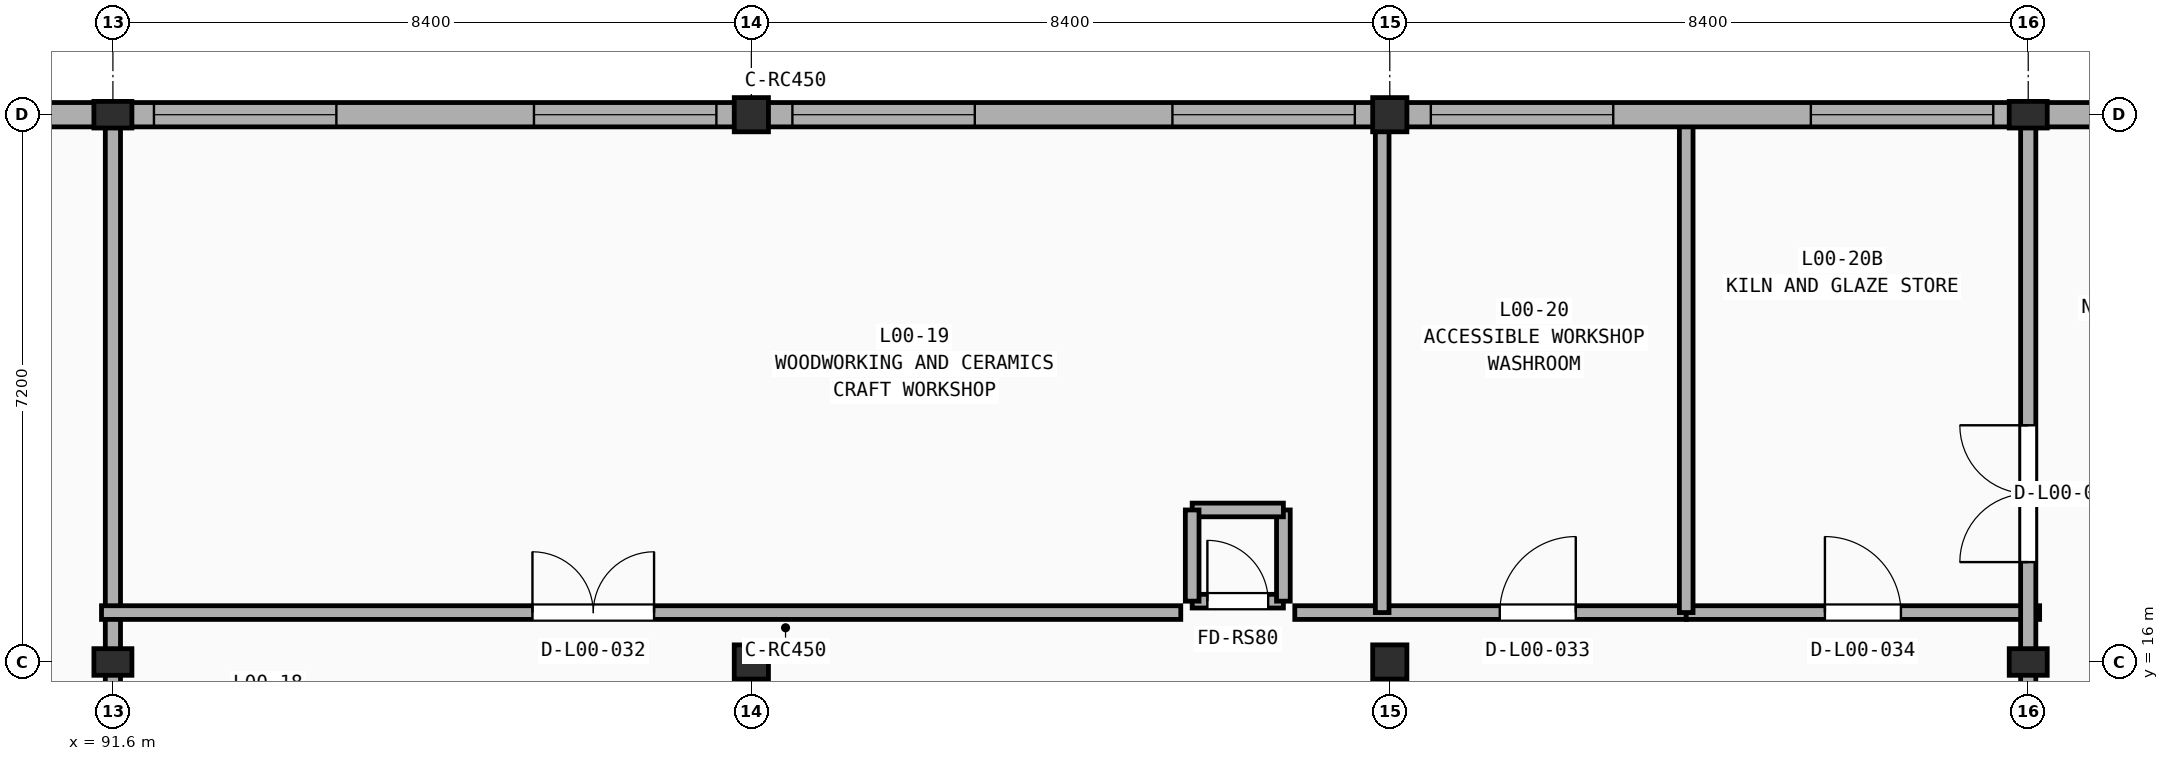
"""IFC4 building model, lengths in metres.
Left out: names, types, materials, properties, quantities, classifications, styles, units other than length and angle.
Written with IfcOpenShell. Run it as: python <this file> out.ifc"""

import sys

from ifc_helpers import new_model, si_unit, direction, frame, frame_2d, origin, origin_2d, place, context, subcontext, project, spatial, rectangle, extrude, element, fill, save


model = new_model("IFC4")
c1 = context("Model", 3, precision=1e-05, world=origin(), true_north=direction((0.0, 1.0)))
c2 = subcontext(c1, "Body", "Model", "MODEL_VIEW")
j1 = project(units=[si_unit("LENGTHUNIT", "METRE"), si_unit("PLANEANGLEUNIT", "RADIAN")], contexts=[c1])
p1 = place(None, origin())
s1 = spatial("IfcSite", under=j1, at=p1, CompositionType="ELEMENT")
p2 = place(p1, origin())
s2 = spatial("IfcBuilding", under=s1, at=p2, CompositionType="ELEMENT")
p3 = place(p2, origin())
s3 = spatial("IfcBuildingStorey", under=s2, at=p3, CompositionType="ELEMENT", Elevation=0.0)
for number, where, z_axis, x_axis in (
    (1, (91.6, 16.0, 0.0), (0.0, 0.0, 1.0), (1.0, 0.0, 0.0)),
    (2, (91.6, 23.2, 0.0), (0.0, 0.0, 1.0), (1.0, 0.0, 0.0)),
):
    element("IfcColumn", number, at=place(p3, frame(where, z_axis=z_axis, x_axis=x_axis)), inside=s3, PredefinedType="PILASTER", context=c2, shape_type="SweptSolid", body=[
        extrude(rectangle(XDim=0.5, YDim=0.35, at=origin_2d()), origin(), (0.0, 0.0, 1.0), 5.4),
    ])
for number, where, z_axis, x_axis in (
    (3, (100.0, 16.0, 0.0), (0.0, 0.0, 1.0), (1.0, 0.0, 0.0)),
    (4, (100.0, 23.2, 0.0), (0.0, 0.0, 1.0), (1.0, 0.0, 0.0)),
    (5, (108.4, 16.0, 0.0), (0.0, 0.0, 1.0), (1.0, 0.0, 0.0)),
    (6, (108.4, 23.2, 0.0), (0.0, 0.0, 1.0), (1.0, 0.0, 0.0)),
):
    element("IfcColumn", number, at=place(p3, frame(where, z_axis=z_axis, x_axis=x_axis)), inside=s3, PredefinedType="COLUMN", context=c2, shape_type="SweptSolid", body=[
        extrude(rectangle(XDim=0.45, YDim=0.45, at=origin_2d()), origin(), (0.0, 0.0, 1.0), 5.4),
    ])
for number, where, z_axis, x_axis in (
    (7, (116.8, 16.0, 0.0), (0.0, 0.0, 1.0), (1.0, 0.0, 0.0)),
    (8, (116.8, 23.2, 0.0), (0.0, 0.0, 1.0), (1.0, 0.0, 0.0)),
):
    element("IfcColumn", number, at=place(p3, frame(where, z_axis=z_axis, x_axis=x_axis)), inside=s3, PredefinedType="PILASTER", context=c2, shape_type="SweptSolid", body=[
        extrude(rectangle(XDim=0.5, YDim=0.35, at=origin_2d()), origin(), (0.0, 0.0, 1.0), 5.4),
    ])
p4 = place(p3, frame((91.6, 8.95, 0.0), z_axis=(0.0, 0.0, 1.0), x_axis=(0.0, 1.0, 0.0)))
e9 = element("IfcWall", 9, at=p4, inside=s3, PredefinedType="PARTITIONING", context=c2, shape_type="SweptSolid", body=[
    extrude(rectangle(XDim=14.1, YDim=0.2, at=frame_2d((7.05, 0.0))), origin(), (0.0, 0.0, 1.0), 3.99),
])
p5 = place(p4, frame((3.936, 0.0, -0.01)))
e10 = element("IfcOpeningElement", 10, at=p5, cuts=e9, PredefinedType="OPENING", context=c2, shape_type="SweptSolid", body=[
    extrude(rectangle(XDim=1.8, YDim=2.26, at=frame_2d((0.9, 1.13))), frame((0.0, 0.11, 0.0), z_axis=(0.0, -1.0, 0.0), x_axis=(1.0, 0.0, 0.0)), (0.0, 0.0, 1.0), 0.22),
])
p6 = place(p3, frame((91.45, 16.65, 0.0), z_axis=(0.0, 0.0, 1.0), x_axis=(1.0, 0.0, 0.0)))
e11 = element("IfcWall", 11, at=p6, inside=s3, PredefinedType="PARTITIONING", context=c2, shape_type="SweptSolid", body=[
    extrude(rectangle(XDim=14.2, YDim=0.18, at=frame_2d((7.1, 0.0))), origin(), (0.0, 0.0, 1.0), 4.64),
])
p7 = place(p6, frame((5.67, 0.0, -0.01)))
e12 = element("IfcOpeningElement", 12, at=p7, cuts=e11, PredefinedType="OPENING", context=c2, shape_type="SweptSolid", body=[
    extrude(rectangle(XDim=1.6, YDim=2.21, at=frame_2d((0.8, 1.105))), frame((0.0, 0.1, 0.0), z_axis=(0.0, -1.0, 0.0), x_axis=(1.0, 0.0, 0.0)), (0.0, 0.0, 1.0), 0.2),
])
p8 = place(p3, frame((107.15, 16.65, 0.0), z_axis=(0.0, 0.0, 1.0), x_axis=(1.0, 0.0, 0.0)))
e13 = element("IfcWall", 13, at=p8, inside=s3, PredefinedType="PARTITIONING", context=c2, shape_type="SweptSolid", body=[
    extrude(rectangle(XDim=5.15, YDim=0.18, at=frame_2d((2.575, 0.0))), origin(), (0.0, 0.0, 1.0), 4.64),
])
p9 = place(p8, frame((2.697, 0.0, -0.01)))
e14 = element("IfcOpeningElement", 14, at=p9, cuts=e13, PredefinedType="OPENING", context=c2, shape_type="SweptSolid", body=[
    extrude(rectangle(XDim=1.0, YDim=2.16, at=frame_2d((0.5, 1.08))), frame((0.0, 0.1, 0.0), z_axis=(0.0, -1.0, 0.0), x_axis=(1.0, 0.0, 0.0)), (0.0, 0.0, 1.0), 0.2),
])
p10 = place(p3, frame((112.3, 16.65, 0.0), z_axis=(0.0, 0.0, 1.0), x_axis=(1.0, 0.0, 0.0)))
e15 = element("IfcWall", 15, at=p10, inside=s3, PredefinedType="PARTITIONING", context=c2, shape_type="SweptSolid", body=[
    extrude(rectangle(XDim=4.65, YDim=0.18, at=frame_2d((2.325, 0.0))), origin(), (0.0, 0.0, 1.0), 4.64),
])
p11 = place(p10, frame((1.825, 0.0, -0.01)))
e16 = element("IfcOpeningElement", 16, at=p11, cuts=e15, PredefinedType="OPENING", context=c2, shape_type="SweptSolid", body=[
    extrude(rectangle(XDim=1.0, YDim=2.16, at=frame_2d((0.5, 1.08))), frame((0.0, 0.1, 0.0), z_axis=(0.0, -1.0, 0.0), x_axis=(1.0, 0.0, 0.0)), (0.0, 0.0, 1.0), 0.2),
])
for number, where, z_axis, x_axis in (
    (17, (108.3, 16.65, 0.0), (0.0, 0.0, 1.0), (0.0, 1.0, 0.0)),
    (18, (112.3, 16.65, 0.0), (0.0, 0.0, 1.0), (0.0, 1.0, 0.0)),
):
    element("IfcWall", number, at=place(p3, frame(where, z_axis=z_axis, x_axis=x_axis)), inside=s3, PredefinedType="PARTITIONING", context=c2, shape_type="SweptSolid", body=[
        extrude(rectangle(XDim=6.4, YDim=0.18, at=frame_2d((3.2, 0.0))), origin(), (0.0, 0.0, 1.0), 4.64),
    ])
p12 = place(p3, frame((116.8, 8.95, 0.0), z_axis=(0.0, 0.0, 1.0), x_axis=(0.0, 1.0, 0.0)))
e19 = element("IfcWall", 19, at=p12, inside=s3, PredefinedType="PARTITIONING", context=c2, shape_type="SweptSolid", body=[
    extrude(rectangle(XDim=14.1, YDim=0.2, at=frame_2d((7.05, 0.0))), origin(), (0.0, 0.0, 1.0), 3.99),
])
p13 = place(p12, frame((8.364, 0.0, -0.01)))
e20 = element("IfcOpeningElement", 20, at=p13, cuts=e19, PredefinedType="OPENING", context=c2, shape_type="SweptSolid", body=[
    extrude(rectangle(XDim=1.8, YDim=2.26, at=frame_2d((0.9, 1.13))), frame((0.0, 0.11, 0.0), z_axis=(0.0, -1.0, 0.0), x_axis=(1.0, 0.0, 0.0)), (0.0, 0.0, 1.0), 0.22),
])
p14 = place(p3, frame((100.0, 23.2, 0.0), z_axis=(0.0, 0.0, 1.0), x_axis=(-1.0, 0.0, 0.0)))
e21 = element("IfcWall", 21, at=p14, inside=s3, PredefinedType="SOLIDWALL", context=c2, shape_type="SweptSolid", body=[
    extrude(rectangle(XDim=8.4, YDim=0.32, at=frame_2d((4.2, 0.0))), origin(), (0.0, 0.0, 1.0), 3.99),
])
p15 = place(p14, frame((0.46, 0.0, 0.9)))
e22 = element("IfcOpeningElement", 22, at=p15, cuts=e21, PredefinedType="OPENING", context=c2, shape_type="SweptSolid", body=[
    extrude(rectangle(XDim=2.4, YDim=2.35, at=frame_2d((1.2, 1.175))), frame((0.0, 0.17, 0.0), z_axis=(0.0, -1.0, 0.0), x_axis=(1.0, 0.0, 0.0)), (0.0, 0.0, 1.0), 0.34),
])
p16 = place(p14, frame((5.46, 0.0, 0.9)))
e23 = element("IfcOpeningElement", 23, at=p16, cuts=e21, PredefinedType="OPENING", context=c2, shape_type="SweptSolid", body=[
    extrude(rectangle(XDim=2.4, YDim=2.35, at=frame_2d((1.2, 1.175))), frame((0.0, 0.17, 0.0), z_axis=(0.0, -1.0, 0.0), x_axis=(1.0, 0.0, 0.0)), (0.0, 0.0, 1.0), 0.34),
])
p17 = place(p3, frame((108.4, 23.2, 0.0), z_axis=(0.0, 0.0, 1.0), x_axis=(-1.0, 0.0, 0.0)))
e24 = element("IfcWall", 24, at=p17, inside=s3, PredefinedType="SOLIDWALL", context=c2, shape_type="SweptSolid", body=[
    extrude(rectangle(XDim=8.4, YDim=0.32, at=frame_2d((4.2, 0.0))), origin(), (0.0, 0.0, 1.0), 4.64),
])
p18 = place(p17, frame((0.46, 0.0, 0.9)))
e25 = element("IfcOpeningElement", 25, at=p18, cuts=e24, PredefinedType="OPENING", context=c2, shape_type="SweptSolid", body=[
    extrude(rectangle(XDim=2.4, YDim=2.35, at=frame_2d((1.2, 1.175))), frame((0.0, 0.17, 0.0), z_axis=(0.0, -1.0, 0.0), x_axis=(1.0, 0.0, 0.0)), (0.0, 0.0, 1.0), 0.34),
])
p19 = place(p17, frame((5.46, 0.0, 0.9)))
e26 = element("IfcOpeningElement", 26, at=p19, cuts=e24, PredefinedType="OPENING", context=c2, shape_type="SweptSolid", body=[
    extrude(rectangle(XDim=2.4, YDim=2.35, at=frame_2d((1.2, 1.175))), frame((0.0, 0.17, 0.0), z_axis=(0.0, -1.0, 0.0), x_axis=(1.0, 0.0, 0.0)), (0.0, 0.0, 1.0), 0.34),
])
p20 = place(p3, frame((116.8, 23.2, 0.0), z_axis=(0.0, 0.0, 1.0), x_axis=(-1.0, 0.0, 0.0)))
e27 = element("IfcWall", 27, at=p20, inside=s3, PredefinedType="SOLIDWALL", context=c2, shape_type="SweptSolid", body=[
    extrude(rectangle(XDim=8.4, YDim=0.32, at=frame_2d((4.2, 0.0))), origin(), (0.0, 0.0, 1.0), 3.99),
])
p21 = place(p20, frame((0.46, 0.0, 0.9)))
e28 = element("IfcOpeningElement", 28, at=p21, cuts=e27, PredefinedType="OPENING", context=c2, shape_type="SweptSolid", body=[
    extrude(rectangle(XDim=2.4, YDim=2.35, at=frame_2d((1.2, 1.175))), frame((0.0, 0.17, 0.0), z_axis=(0.0, -1.0, 0.0), x_axis=(1.0, 0.0, 0.0)), (0.0, 0.0, 1.0), 0.34),
])
p22 = place(p20, frame((5.46, 0.0, 0.9)))
e29 = element("IfcOpeningElement", 29, at=p22, cuts=e27, PredefinedType="OPENING", context=c2, shape_type="SweptSolid", body=[
    extrude(rectangle(XDim=2.4, YDim=2.35, at=frame_2d((1.2, 1.175))), frame((0.0, 0.17, 0.0), z_axis=(0.0, -1.0, 0.0), x_axis=(1.0, 0.0, 0.0)), (0.0, 0.0, 1.0), 0.34),
])
p23 = place(p3, frame((91.6, 23.2, 0.0), z_axis=(0.0, 0.0, 1.0), x_axis=(-1.0, 0.0, 0.0)))
e30 = element("IfcWall", 30, at=p23, inside=s3, PredefinedType="SOLIDWALL", context=c2, shape_type="SweptSolid", body=[
    extrude(rectangle(XDim=4.8, YDim=0.32, at=frame_2d((2.4, 0.0))), origin(), (0.0, 0.0, 1.0), 3.99),
])
p24 = place(p23, frame((1.46, 0.0, 0.9)))
e31 = element("IfcOpeningElement", 31, at=p24, cuts=e30, PredefinedType="OPENING", context=c2, shape_type="SweptSolid", body=[
    extrude(rectangle(XDim=1.8, YDim=2.2, at=frame_2d((0.9, 1.1))), frame((0.0, 0.17, 0.0), z_axis=(0.0, -1.0, 0.0), x_axis=(1.0, 0.0, 0.0)), (0.0, 0.0, 1.0), 0.34),
])
p25 = place(p3, frame((121.6, 23.2, 0.0), z_axis=(0.0, 0.0, 1.0), x_axis=(-1.0, 0.0, 0.0)))
e32 = element("IfcWall", 32, at=p25, inside=s3, PredefinedType="SOLIDWALL", context=c2, shape_type="SweptSolid", body=[
    extrude(rectangle(XDim=4.8, YDim=0.32, at=frame_2d((2.4, 0.0))), origin(), (0.0, 0.0, 1.0), 3.99),
])
p26 = place(p25, frame((1.46, 0.0, 0.9)))
e33 = element("IfcOpeningElement", 33, at=p26, cuts=e32, PredefinedType="OPENING", context=c2, shape_type="SweptSolid", body=[
    extrude(rectangle(XDim=1.8, YDim=2.2, at=frame_2d((0.9, 1.1))), frame((0.0, 0.17, 0.0), z_axis=(0.0, -1.0, 0.0), x_axis=(1.0, 0.0, 0.0)), (0.0, 0.0, 1.0), 0.34),
])
p27 = place(p3, frame((105.8, 16.8, 0.0), z_axis=(0.0, 0.0, 1.0), x_axis=(1.0, 0.0, 0.0)))
e34 = element("IfcWall", 34, at=p27, inside=s3, PredefinedType="SOLIDWALL", context=c2, shape_type="SweptSolid", body=[
    extrude(rectangle(XDim=1.2, YDim=0.18, at=frame_2d((0.6, 0.0))), origin(), (0.0, 0.0, 1.0), 5.07),
])
p28 = place(p27, frame((0.2, 0.0, -0.01)))
e35 = element("IfcOpeningElement", 35, at=p28, cuts=e34, PredefinedType="OPENING", context=c2, shape_type="SweptSolid", body=[
    extrude(rectangle(XDim=0.8, YDim=2.06, at=frame_2d((0.4, 1.03))), frame((0.0, 0.1, 0.0), z_axis=(0.0, -1.0, 0.0), x_axis=(1.0, 0.0, 0.0)), (0.0, 0.0, 1.0), 0.2),
])
for number, where, z_axis, x_axis in (
    (36, (107.0, 16.8, 0.0), (0.0, 0.0, 1.0), (0.0, 1.0, 0.0)),
    (37, (107.0, 18.0, 0.0), (0.0, 0.0, 1.0), (-1.0, 0.0, 0.0)),
    (38, (105.8, 18.0, 0.0), (0.0, 0.0, 1.0), (0.0, -1.0, 0.0)),
):
    element("IfcWall", number, at=place(p3, frame(where, z_axis=z_axis, x_axis=x_axis)), inside=s3, PredefinedType="SOLIDWALL", context=c2, shape_type="SweptSolid", body=[
        extrude(rectangle(XDim=1.2, YDim=0.18, at=frame_2d((0.6, 0.0))), origin(), (0.0, 0.0, 1.0), 5.07),
    ])
p29 = place(p7, frame((0.0, 0.0, 0.01)))
e39 = element("IfcDoor", 39, at=p29, inside=s3, OperationType="DOUBLE_SWING_LEFT", PredefinedType="DOOR", context=c2, shape_type="SweptSolid", body=[
    extrude(rectangle(XDim=1.6, YDim=2.2, at=frame_2d((0.8, 1.1))), frame((0.0, 0.025, 0.0), z_axis=(0.0, -1.0, 0.0), x_axis=(1.0, 0.0, 0.0)), (0.0, 0.0, 1.0), 0.05),
])
fill(e12, e39)
p30 = place(p9, frame((1.0, 0.0, 0.01), z_axis=(0.0, 0.0, 1.0), x_axis=(-1.0, 0.0, 0.0)))
e40 = element("IfcDoor", 40, at=p30, inside=s3, OperationType="SINGLE_SWING_RIGHT", PredefinedType="DOOR", context=c2, shape_type="SweptSolid", body=[
    extrude(rectangle(XDim=1.0, YDim=2.15, at=frame_2d((0.5, 1.075))), frame((0.0, 0.025, 0.0), z_axis=(0.0, -1.0, 0.0), x_axis=(1.0, 0.0, 0.0)), (0.0, 0.0, 1.0), 0.05),
])
fill(e14, e40)
p31 = place(p11, frame((0.0, 0.0, 0.01)))
e41 = element("IfcDoor", 41, at=p31, inside=s3, OperationType="SINGLE_SWING_LEFT", PredefinedType="DOOR", context=c2, shape_type="SweptSolid", body=[
    extrude(rectangle(XDim=1.0, YDim=2.15, at=frame_2d((0.5, 1.075))), frame((0.0, 0.025, 0.0), z_axis=(0.0, -1.0, 0.0), x_axis=(1.0, 0.0, 0.0)), (0.0, 0.0, 1.0), 0.05),
])
fill(e16, e41)
p32 = place(p13, frame((0.0, 0.0, 0.01)))
e42 = element("IfcDoor", 42, at=p32, inside=s3, OperationType="DOUBLE_SWING_LEFT", PredefinedType="DOOR", context=c2, shape_type="SweptSolid", body=[
    extrude(rectangle(XDim=1.8, YDim=2.25, at=frame_2d((0.9, 1.125))), frame((0.0, 0.025, 0.0), z_axis=(0.0, -1.0, 0.0), x_axis=(1.0, 0.0, 0.0)), (0.0, 0.0, 1.0), 0.05),
])
fill(e20, e42)
p33 = place(p15, origin())
e43 = element("IfcWindow", 43, at=p33, inside=s3, PartitioningType="TRIPLE_PANEL_VERTICAL", PredefinedType="WINDOW", context=c2, shape_type="SweptSolid", body=[
    extrude(rectangle(XDim=2.4, YDim=2.35, at=frame_2d((1.2, 1.175))), frame((0.0, 0.03, 0.0), z_axis=(0.0, -1.0, 0.0), x_axis=(1.0, 0.0, 0.0)), (0.0, 0.0, 1.0), 0.06),
])
fill(e22, e43)
p34 = place(p16, origin())
e44 = element("IfcWindow", 44, at=p34, inside=s3, PartitioningType="TRIPLE_PANEL_VERTICAL", PredefinedType="WINDOW", context=c2, shape_type="SweptSolid", body=[
    extrude(rectangle(XDim=2.4, YDim=2.35, at=frame_2d((1.2, 1.175))), frame((0.0, 0.03, 0.0), z_axis=(0.0, -1.0, 0.0), x_axis=(1.0, 0.0, 0.0)), (0.0, 0.0, 1.0), 0.06),
])
fill(e23, e44)
p35 = place(p18, origin())
e45 = element("IfcWindow", 45, at=p35, inside=s3, PartitioningType="TRIPLE_PANEL_VERTICAL", PredefinedType="WINDOW", context=c2, shape_type="SweptSolid", body=[
    extrude(rectangle(XDim=2.4, YDim=2.35, at=frame_2d((1.2, 1.175))), frame((0.0, 0.03, 0.0), z_axis=(0.0, -1.0, 0.0), x_axis=(1.0, 0.0, 0.0)), (0.0, 0.0, 1.0), 0.06),
])
fill(e25, e45)
p36 = place(p19, origin())
e46 = element("IfcWindow", 46, at=p36, inside=s3, PartitioningType="TRIPLE_PANEL_VERTICAL", PredefinedType="WINDOW", context=c2, shape_type="SweptSolid", body=[
    extrude(rectangle(XDim=2.4, YDim=2.35, at=frame_2d((1.2, 1.175))), frame((0.0, 0.03, 0.0), z_axis=(0.0, -1.0, 0.0), x_axis=(1.0, 0.0, 0.0)), (0.0, 0.0, 1.0), 0.06),
])
fill(e26, e46)
p37 = place(p21, origin())
e47 = element("IfcWindow", 47, at=p37, inside=s3, PartitioningType="TRIPLE_PANEL_VERTICAL", PredefinedType="WINDOW", context=c2, shape_type="SweptSolid", body=[
    extrude(rectangle(XDim=2.4, YDim=2.35, at=frame_2d((1.2, 1.175))), frame((0.0, 0.03, 0.0), z_axis=(0.0, -1.0, 0.0), x_axis=(1.0, 0.0, 0.0)), (0.0, 0.0, 1.0), 0.06),
])
fill(e28, e47)
p38 = place(p22, origin())
e48 = element("IfcWindow", 48, at=p38, inside=s3, PartitioningType="TRIPLE_PANEL_VERTICAL", PredefinedType="WINDOW", context=c2, shape_type="SweptSolid", body=[
    extrude(rectangle(XDim=2.4, YDim=2.35, at=frame_2d((1.2, 1.175))), frame((0.0, 0.03, 0.0), z_axis=(0.0, -1.0, 0.0), x_axis=(1.0, 0.0, 0.0)), (0.0, 0.0, 1.0), 0.06),
])
fill(e29, e48)
p39 = place(p28, frame((0.0, 0.0, 0.01)))
e49 = element("IfcDoor", 49, at=p39, inside=s3, OperationType="SINGLE_SWING_LEFT", PredefinedType="DOOR", context=c2, shape_type="SweptSolid", body=[
    extrude(rectangle(XDim=0.8, YDim=2.05, at=frame_2d((0.4, 1.025))), frame((0.0, 0.025, 0.0), z_axis=(0.0, -1.0, 0.0), x_axis=(1.0, 0.0, 0.0)), (0.0, 0.0, 1.0), 0.05),
])
fill(e35, e49)
save(model, sys.argv[1])
